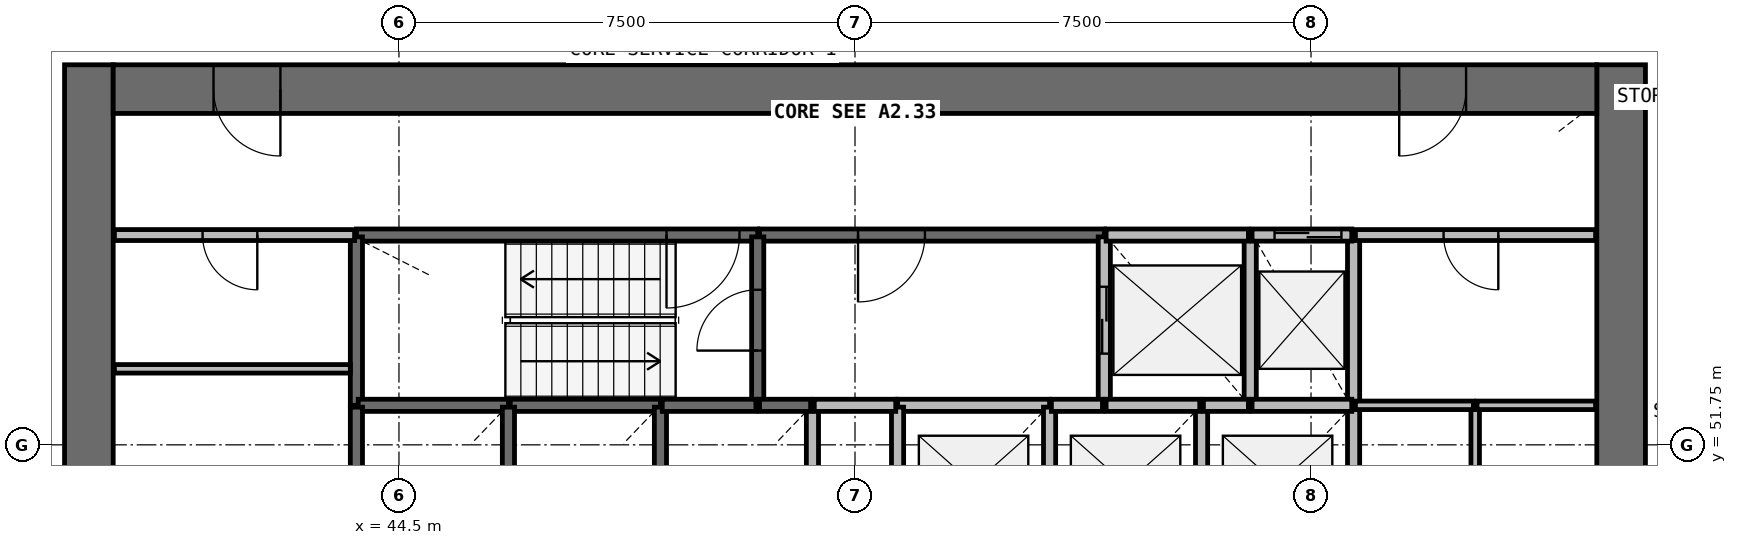
"""IFC4 building model, lengths in metres.
Left out: names, types, materials, properties, quantities, classifications, styles, units other than length and angle.
Written with IfcOpenShell. Run it as: python <this file> out.ifc"""

import sys

from ifc_helpers import new_model, si_unit, direction, frame, frame_2d, origin, place, context, subcontext, project, spatial, rectangle, extrude, source, transform, mapped, element, fill, save


model = new_model("IFC4")
c1 = context("Model", 3, precision=1e-05, world=origin(), true_north=direction((0.0, 1.0)))
c2 = subcontext(c1, "Body", "Model", "MODEL_VIEW")
j1 = project(units=[si_unit("LENGTHUNIT", "METRE"), si_unit("PLANEANGLEUNIT", "RADIAN")], contexts=[c1])
p1 = place(None, origin())
s1 = spatial("IfcSite", under=j1, at=p1, CompositionType="ELEMENT")
p2 = place(p1, origin())
s2 = spatial("IfcBuilding", under=s1, at=p2, CompositionType="ELEMENT")
p3 = place(p2, frame((0.0, 0.0, 137.0)))
s3 = spatial("IfcBuildingStorey", under=s2, at=p3, CompositionType="ELEMENT", Elevation=137.0)
p4 = place(p3, frame((64.6, 38.0, 0.0), z_axis=(0.0, 0.0, 1.0), x_axis=(0.0, 1.0, 0.0)))
e1 = element("IfcWall", 1, at=p4, inside=s3, PredefinedType="SHEAR", context=c2, shape_type="SweptSolid", body=[
    extrude(rectangle(XDim=20.0, YDim=0.8, at=frame_2d((10.0, 0.0))), origin(), (0.0, 0.0, 1.0), 3.9),
])
p5 = place(p4, frame((9.1, 0.0, 0.0)))
e2 = element("IfcOpeningElement", 2, at=p5, cuts=e1, PredefinedType="OPENING", context=c2, shape_type="SweptSolid", body=[
    extrude(rectangle(XDim=1.8, YDim=2.1, at=frame_2d((0.9, 1.05))), frame((0.0, 0.41, 0.0), z_axis=(0.0, -1.0, 0.0), x_axis=(1.0, 0.0, 0.0)), (0.0, 0.0, 1.0), 0.82),
])
p6 = place(p3, frame((39.4, 58.0, 0.0), z_axis=(0.0, 0.0, 1.0), x_axis=(0.0, -1.0, 0.0)))
e3 = element("IfcWall", 3, at=p6, inside=s3, PredefinedType="SHEAR", context=c2, shape_type="SweptSolid", body=[
    extrude(rectangle(XDim=20.0, YDim=0.8, at=frame_2d((10.0, 0.0))), origin(), (0.0, 0.0, 1.0), 3.9),
])
p7 = place(p6, frame((9.1, 0.0, 0.0)))
e4 = element("IfcOpeningElement", 4, at=p7, cuts=e3, PredefinedType="OPENING", context=c2, shape_type="SweptSolid", body=[
    extrude(rectangle(XDim=1.8, YDim=2.1, at=frame_2d((0.9, 1.05))), frame((0.0, 0.41, 0.0), z_axis=(0.0, -1.0, 0.0), x_axis=(1.0, 0.0, 0.0)), (0.0, 0.0, 1.0), 0.82),
])
p8 = place(p3, frame((64.2, 57.6, 0.0), z_axis=(0.0, 0.0, 1.0), x_axis=(-1.0, 0.0, 0.0)))
e5 = element("IfcWall", 5, at=p8, inside=s3, PredefinedType="SHEAR", context=c2, shape_type="SweptSolid", body=[
    extrude(rectangle(XDim=24.4, YDim=0.8, at=frame_2d((12.2, 0.0))), origin(), (0.0, 0.0, 1.0), 3.9),
])
p9 = place(p8, frame((21.65, 0.0, 0.0)))
e6 = element("IfcOpeningElement", 6, at=p9, cuts=e5, PredefinedType="OPENING", context=c2, shape_type="SweptSolid", body=[
    extrude(rectangle(XDim=1.1, YDim=2.1, at=frame_2d((0.55, 1.05))), frame((0.0, 0.41, 0.0), z_axis=(0.0, -1.0, 0.0), x_axis=(1.0, 0.0, 0.0)), (0.0, 0.0, 1.0), 0.82),
])
p10 = place(p8, frame((2.15, 0.0, 0.0)))
e7 = element("IfcOpeningElement", 7, at=p10, cuts=e5, PredefinedType="OPENING", context=c2, shape_type="SweptSolid", body=[
    extrude(rectangle(XDim=1.1, YDim=2.1, at=frame_2d((0.55, 1.05))), frame((0.0, 0.41, 0.0), z_axis=(0.0, -1.0, 0.0), x_axis=(1.0, 0.0, 0.0)), (0.0, 0.0, 1.0), 0.82),
])
p11 = place(p3, frame((50.4, 55.2, 0.0), z_axis=(0.0, 0.0, 1.0), x_axis=(-1.0, 0.0, 0.0)))
e8 = element("IfcWall", 8, at=p11, inside=s3, PredefinedType="SOLIDWALL", context=c2, shape_type="SweptSolid", body=[
    extrude(rectangle(XDim=6.6, YDim=0.2, at=frame_2d((3.3, 0.0))), origin(), (0.0, 0.0, 1.0), 3.58),
])
p12 = place(p11, frame((0.3, 0.0, 0.0)))
e9 = element("IfcOpeningElement", 9, at=p12, cuts=e8, PredefinedType="OPENING", context=c2, shape_type="SweptSolid", body=[
    extrude(rectangle(XDim=1.2, YDim=2.1, at=frame_2d((0.6, 1.05))), frame((0.0, 0.11, 0.0), z_axis=(0.0, -1.0, 0.0), x_axis=(1.0, 0.0, 0.0)), (0.0, 0.0, 1.0), 0.22),
])
p13 = place(p3, frame((56.1, 55.2, 0.0), z_axis=(0.0, 0.0, 1.0), x_axis=(-1.0, 0.0, 0.0)))
e10 = element("IfcWall", 10, at=p13, inside=s3, PredefinedType="SOLIDWALL", context=c2, shape_type="SweptSolid", body=[
    extrude(rectangle(XDim=5.67, YDim=0.2, at=frame_2d((2.835, 0.0))), origin(), (0.0, 0.0, 1.0), 3.58),
])
p14 = place(p13, frame((2.95, 0.0, 0.0)))
e11 = element("IfcOpeningElement", 11, at=p14, cuts=e10, PredefinedType="OPENING", context=c2, shape_type="SweptSolid", body=[
    extrude(rectangle(XDim=1.1, YDim=2.1, at=frame_2d((0.55, 1.05))), frame((0.0, 0.11, 0.0), z_axis=(0.0, -1.0, 0.0), x_axis=(1.0, 0.0, 0.0)), (0.0, 0.0, 1.0), 0.22),
])
p15 = place(p3, frame((43.8, 55.17, 0.0), z_axis=(0.0, 0.0, 1.0), x_axis=(0.0, -1.0, 0.0)))
e12 = element("IfcWall", 12, at=p15, inside=s3, PredefinedType="SOLIDWALL", context=c2, shape_type="SweptSolid", body=[
    extrude(rectangle(XDim=2.77, YDim=0.2, at=frame_2d((1.385, 0.0))), origin(), (0.0, 0.0, 1.0), 3.58),
])
p16 = place(p3, frame((50.4, 52.4, 0.0), z_axis=(0.0, 0.0, 1.0), x_axis=(0.0, 1.0, 0.0)))
e13 = element("IfcWall", 13, at=p16, inside=s3, PredefinedType="SOLIDWALL", context=c2, shape_type="SweptSolid", body=[
    extrude(rectangle(XDim=2.77, YDim=0.2, at=frame_2d((1.385, 0.0))), origin(), (0.0, 0.0, 1.0), 3.58),
])
p17 = place(p16, frame((0.9, 0.0, 0.0)))
e14 = element("IfcOpeningElement", 14, at=p17, cuts=e13, PredefinedType="OPENING", context=c2, shape_type="SweptSolid", body=[
    extrude(rectangle(XDim=1.0, YDim=2.1, at=frame_2d((0.5, 1.05))), frame((0.0, 0.11, 0.0), z_axis=(0.0, -1.0, 0.0), x_axis=(1.0, 0.0, 0.0)), (0.0, 0.0, 1.0), 0.22),
])
p18 = place(p3, frame((56.1, 55.17, 0.0), z_axis=(0.0, 0.0, 1.0), x_axis=(0.0, -1.0, 0.0)))
e15 = element("IfcWall", 15, at=p18, inside=s3, PredefinedType="SOLIDWALL", context=c2, shape_type="SweptSolid", body=[
    extrude(rectangle(XDim=2.77, YDim=0.2, at=frame_2d((1.385, 0.0))), origin(), (0.0, 0.0, 1.0), 3.58),
])
p19 = place(p18, frame((0.82, 0.0, 0.0)))
e16 = element("IfcOpeningElement", 16, at=p19, cuts=e15, PredefinedType="OPENING", context=c2, shape_type="SweptSolid", body=[
    extrude(rectangle(XDim=1.1, YDim=2.1, at=frame_2d((0.55, 1.05))), frame((0.0, 0.11, 0.0), z_axis=(0.0, -1.0, 0.0), x_axis=(1.0, 0.0, 0.0)), (0.0, 0.0, 1.0), 0.22),
])
for number, where, z_axis, x_axis in (
    (17, (58.5, 52.4, 0.0), (0.0, 0.0, 1.0), (0.0, 1.0, 0.0)),
    (18, (60.2, 52.4, 0.0), (0.0, 0.0, 1.0), (0.0, 1.0, 0.0)),
):
    element("IfcWall", number, at=place(p3, frame(where, z_axis=z_axis, x_axis=x_axis)), inside=s3, PredefinedType="SOLIDWALL", context=c2, shape_type="SweptSolid", body=[
        extrude(rectangle(XDim=2.8, YDim=0.2, at=frame_2d((1.4, 0.0))), origin(), (0.0, 0.0, 1.0), 3.58),
    ])
for number, where, z_axis, x_axis in (
    (19, (46.3, 52.4, 0.0), (0.0, 0.0, 1.0), (-1.0, 0.0, 0.0)),
    (20, (48.8, 52.4, 0.0), (0.0, 0.0, 1.0), (-1.0, 0.0, 0.0)),
):
    element("IfcWall", number, at=place(p3, frame(where, z_axis=z_axis, x_axis=x_axis)), inside=s3, PredefinedType="SOLIDWALL", context=c2, shape_type="SweptSolid", body=[
        extrude(rectangle(XDim=2.47, YDim=0.2, at=frame_2d((1.235, 0.0))), origin(), (0.0, 0.0, 1.0), 3.58),
    ])
p20 = place(p3, frame((55.2, 52.4, 0.0), z_axis=(0.0, 0.0, 1.0), x_axis=(-1.0, 0.0, 0.0)))
e21 = element("IfcWall", 21, at=p20, inside=s3, PredefinedType="SOLIDWALL", context=c2, shape_type="SweptSolid", body=[
    extrude(rectangle(XDim=2.5, YDim=0.2, at=frame_2d((1.25, 0.0))), origin(), (0.0, 0.0, 1.0), 3.58),
])
p21 = place(p3, frame((58.47, 55.2, 0.0), z_axis=(0.0, 0.0, 1.0), x_axis=(-1.0, 0.0, 0.0)))
e22 = element("IfcWall", 22, at=p21, inside=s3, PredefinedType="SOLIDWALL", context=c2, shape_type="SweptSolid", body=[
    extrude(rectangle(XDim=2.34, YDim=0.2, at=frame_2d((1.17, 0.0))), origin(), (0.0, 0.0, 1.0), 3.58),
])
for number, where, z_axis, x_axis in (
    (23, (43.8, 52.37, 0.0), (0.0, 0.0, 1.0), (0.0, -1.0, 0.0)),
    (24, (46.3, 50.01, 0.0), (0.0, 0.0, 1.0), (0.0, 1.0, 0.0)),
    (25, (48.8, 50.01, 0.0), (0.0, 0.0, 1.0), (0.0, 1.0, 0.0)),
):
    element("IfcWall", number, at=place(p3, frame(where, z_axis=z_axis, x_axis=x_axis)), inside=s3, PredefinedType="SOLIDWALL", context=c2, shape_type="SweptSolid", body=[
        extrude(rectangle(XDim=2.36, YDim=0.2, at=frame_2d((1.18, 0.0))), origin(), (0.0, 0.0, 1.0), 3.58),
    ])
p22 = place(p3, frame((51.3, 50.01, 0.0), z_axis=(0.0, 0.0, 1.0), x_axis=(0.0, 1.0, 0.0)))
e26 = element("IfcWall", 26, at=p22, inside=s3, PredefinedType="SOLIDWALL", context=c2, shape_type="SweptSolid", body=[
    extrude(rectangle(XDim=2.39, YDim=0.2, at=frame_2d((1.195, 0.0))), origin(), (0.0, 0.0, 1.0), 3.58),
])
for number, where, z_axis, x_axis in (
    (27, (52.7, 52.37, 0.0), (0.0, 0.0, 1.0), (0.0, -1.0, 0.0)),
    (28, (55.2, 50.01, 0.0), (0.0, 0.0, 1.0), (0.0, 1.0, 0.0)),
):
    element("IfcWall", number, at=place(p3, frame(where, z_axis=z_axis, x_axis=x_axis)), inside=s3, PredefinedType="SOLIDWALL", context=c2, shape_type="SweptSolid", body=[
        extrude(rectangle(XDim=2.36, YDim=0.2, at=frame_2d((1.18, 0.0))), origin(), (0.0, 0.0, 1.0), 3.58),
    ])
p23 = place(p3, frame((57.7, 50.01, 0.0), z_axis=(0.0, 0.0, 1.0), x_axis=(0.0, 1.0, 0.0)))
e29 = element("IfcWall", 29, at=p23, inside=s3, PredefinedType="SOLIDWALL", context=c2, shape_type="SweptSolid", body=[
    extrude(rectangle(XDim=2.39, YDim=0.2, at=frame_2d((1.195, 0.0))), origin(), (0.0, 0.0, 1.0), 3.58),
])
p24 = place(p3, frame((60.2, 50.01, 0.0), z_axis=(0.0, 0.0, 1.0), x_axis=(0.0, 1.0, 0.0)))
e30 = element("IfcWall", 30, at=p24, inside=s3, PredefinedType="SOLIDWALL", context=c2, shape_type="SweptSolid", body=[
    extrude(rectangle(XDim=2.36, YDim=0.2, at=frame_2d((1.18, 0.0))), origin(), (0.0, 0.0, 1.0), 3.58),
])
p25 = place(p3, frame((60.17, 52.4, 0.0), z_axis=(0.0, 0.0, 1.0), x_axis=(-1.0, 0.0, 0.0)))
e31 = element("IfcWall", 31, at=p25, inside=s3, PredefinedType="SOLIDWALL", context=c2, shape_type="SweptSolid", body=[
    extrude(rectangle(XDim=1.64, YDim=0.2, at=frame_2d((0.82, 0.0))), origin(), (0.0, 0.0, 1.0), 3.58),
])
p26 = place(p3, frame((60.17, 55.2, 0.0), z_axis=(0.0, 0.0, 1.0), x_axis=(-1.0, 0.0, 0.0)))
e32 = element("IfcWall", 32, at=p26, inside=s3, PredefinedType="SOLIDWALL", context=c2, shape_type="SweptSolid", body=[
    extrude(rectangle(XDim=1.64, YDim=0.2, at=frame_2d((0.82, 0.0))), origin(), (0.0, 0.0, 1.0), 3.58),
])
p27 = place(p26, frame((0.17, 0.0, 0.0)))
e33 = element("IfcOpeningElement", 33, at=p27, cuts=e32, PredefinedType="OPENING", context=c2, shape_type="SweptSolid", body=[
    extrude(rectangle(XDim=1.1, YDim=2.1, at=frame_2d((0.55, 1.05))), frame((0.0, 0.11, 0.0), z_axis=(0.0, -1.0, 0.0), x_axis=(1.0, 0.0, 0.0)), (0.0, 0.0, 1.0), 0.22),
])
for number, where, z_axis, x_axis in (
    (34, (50.37, 52.4, 0.0), (0.0, 0.0, 1.0), (-1.0, 0.0, 0.0)),
    (35, (57.67, 52.4, 0.0), (0.0, 0.0, 1.0), (-1.0, 0.0, 0.0)),
):
    element("IfcWall", number, at=place(p3, frame(where, z_axis=z_axis, x_axis=x_axis)), inside=s3, PredefinedType="SOLIDWALL", context=c2, shape_type="SweptSolid", body=[
        extrude(rectangle(XDim=1.54, YDim=0.2, at=frame_2d((0.77, 0.0))), origin(), (0.0, 0.0, 1.0), 3.58),
    ])
p28 = place(p3, frame((51.33, 52.4, 0.0), z_axis=(0.0, 0.0, 1.0), x_axis=(1.0, 0.0, 0.0)))
e36 = element("IfcWall", 36, at=p28, inside=s3, PredefinedType="SOLIDWALL", context=c2, shape_type="SweptSolid", body=[
    extrude(rectangle(XDim=1.34, YDim=0.2, at=frame_2d((0.67, 0.0))), origin(), (0.0, 0.0, 1.0), 3.58),
])
for number, where, z_axis, x_axis in (
    (37, (51.27, 52.4, 0.0), (0.0, 0.0, 1.0), (-1.0, 0.0, 0.0)),
    (38, (56.07, 52.4, 0.0), (0.0, 0.0, 1.0), (-1.0, 0.0, 0.0)),
):
    element("IfcWall", number, at=place(p3, frame(where, z_axis=z_axis, x_axis=x_axis)), inside=s3, PredefinedType="SOLIDWALL", context=c2, shape_type="SweptSolid", body=[
        extrude(rectangle(XDim=0.84, YDim=0.2, at=frame_2d((0.42, 0.0))), origin(), (0.0, 0.0, 1.0), 3.58),
    ])
p29 = place(p3, frame((58.47, 52.4, 0.0), z_axis=(0.0, 0.0, 1.0), x_axis=(-1.0, 0.0, 0.0)))
e39 = element("IfcWall", 39, at=p29, inside=s3, PredefinedType="SOLIDWALL", context=c2, shape_type="SweptSolid", body=[
    extrude(rectangle(XDim=0.74, YDim=0.2, at=frame_2d((0.37, 0.0))), origin(), (0.0, 0.0, 1.0), 3.58),
])
p30 = place(p3, frame((64.18, 55.2, 0.0), z_axis=(0.0, 0.0, 1.0), x_axis=(-1.0, 0.0, 0.0)))
e40 = element("IfcWall", 40, at=p30, inside=s3, PredefinedType="PARTITIONING", context=c2, shape_type="SweptSolid", body=[
    extrude(rectangle(XDim=3.95, YDim=0.18, at=frame_2d((1.975, 0.0))), origin(), (0.0, 0.0, 1.0), 2.7),
])
p31 = place(p30, frame((1.6, 0.0, 0.0)))
e41 = element("IfcOpeningElement", 41, at=p31, cuts=e40, PredefinedType="OPENING", context=c2, shape_type="SweptSolid", body=[
    extrude(rectangle(XDim=0.9, YDim=2.1, at=frame_2d((0.45, 1.05))), frame((0.0, 0.1, 0.0), z_axis=(0.0, -1.0, 0.0), x_axis=(1.0, 0.0, 0.0)), (0.0, 0.0, 1.0), 0.2),
])
p32 = place(p3, frame((43.77, 55.2, 0.0), z_axis=(0.0, 0.0, 1.0), x_axis=(-1.0, 0.0, 0.0)))
e42 = element("IfcWall", 42, at=p32, inside=s3, PredefinedType="PARTITIONING", context=c2, shape_type="SweptSolid", body=[
    extrude(rectangle(XDim=3.95, YDim=0.18, at=frame_2d((1.975, 0.0))), origin(), (0.0, 0.0, 1.0), 2.7),
])
p33 = place(p32, frame((1.6, 0.0, 0.0)))
e43 = element("IfcOpeningElement", 43, at=p33, cuts=e42, PredefinedType="OPENING", context=c2, shape_type="SweptSolid", body=[
    extrude(rectangle(XDim=0.9, YDim=2.1, at=frame_2d((0.45, 1.05))), frame((0.0, 0.1, 0.0), z_axis=(0.0, -1.0, 0.0), x_axis=(1.0, 0.0, 0.0)), (0.0, 0.0, 1.0), 0.2),
])
p34 = place(p3, frame((39.82, 53.0, 0.0), z_axis=(0.0, 0.0, 1.0), x_axis=(1.0, 0.0, 0.0)))
e44 = element("IfcWall", 44, at=p34, inside=s3, PredefinedType="PARTITIONING", context=c2, shape_type="SweptSolid", body=[
    extrude(rectangle(XDim=3.88, YDim=0.14, at=frame_2d((1.94, 0.0))), origin(), (0.0, 0.0, 1.0), 2.88),
])
p35 = place(p3, frame((62.2, 50.01, 0.0), z_axis=(0.0, 0.0, 1.0), x_axis=(0.0, 1.0, 0.0)))
e45 = element("IfcWall", 45, at=p35, inside=s3, PredefinedType="PARTITIONING", context=c2, shape_type="SweptSolid", body=[
    extrude(rectangle(XDim=2.39, YDim=0.14, at=frame_2d((1.195, 0.0))), origin(), (0.0, 0.0, 1.0), 2.88),
])
p36 = place(p3, frame((62.17, 52.4, 0.0), z_axis=(0.0, 0.0, 1.0), x_axis=(-1.0, 0.0, 0.0)))
e46 = element("IfcWall", 46, at=p36, inside=s3, PredefinedType="PARTITIONING", context=c2, shape_type="SweptSolid", body=[
    extrude(rectangle(XDim=1.94, YDim=0.14, at=frame_2d((0.97, 0.0))), origin(), (0.0, 0.0, 1.0), 2.88),
])
p37 = place(p3, frame((64.18, 52.4, 0.0), z_axis=(0.0, 0.0, 1.0), x_axis=(-1.0, 0.0, 0.0)))
e47 = element("IfcWall", 47, at=p37, inside=s3, PredefinedType="PARTITIONING", context=c2, shape_type="SweptSolid", body=[
    extrude(rectangle(XDim=1.95, YDim=0.14, at=frame_2d((0.975, 0.0))), origin(), (0.0, 0.0, 1.0), 2.88),
])
m1 = source(origin(), c2, "Body", "SweptSolid", [
    extrude(rectangle(XDim=1.1, YDim=2.1, at=frame_2d((0.55, 1.05))), frame((0.0, 0.025, 0.0), z_axis=(0.0, -1.0, 0.0), x_axis=(1.0, 0.0, 0.0)), (0.0, 0.0, 1.0), 0.05),
])
p38 = place(p19, origin())
e48 = element("IfcDoor", 48, at=p38, inside=s3, OperationType="DOUBLE_DOOR_SLIDING", PredefinedType="USERDEFINED", context=c2, shape_type="MappedRepresentation", body=[
    mapped(m1, transform((0.0, 0.0, 0.0), scale=1.0)),
])
fill(e16, e48)
p39 = place(p27, origin())
e49 = element("IfcDoor", 49, at=p39, inside=s3, OperationType="DOUBLE_DOOR_SLIDING", PredefinedType="USERDEFINED", context=c2, shape_type="MappedRepresentation", body=[
    mapped(m1, transform((0.0, 0.0, 0.0), scale=1.0)),
])
fill(e33, e49)
m2 = source(origin(), c2, "Body", "SweptSolid", [
    extrude(rectangle(XDim=1.2, YDim=2.1, at=frame_2d((0.6, 1.05))), frame((0.0, 0.025, 0.0), z_axis=(0.0, -1.0, 0.0), x_axis=(1.0, 0.0, 0.0)), (0.0, 0.0, 1.0), 0.05),
])
p40 = place(p12, origin())
e50 = element("IfcDoor", 50, at=p40, inside=s3, OperationType="SINGLE_SWING_RIGHT", PredefinedType="DOOR", context=c2, shape_type="MappedRepresentation", body=[
    mapped(m2, transform((0.0, 0.0, 0.0), scale=1.0)),
])
fill(e9, e50)
m3 = source(origin(), c2, "Body", "SweptSolid", [
    extrude(rectangle(XDim=1.0, YDim=2.1, at=frame_2d((0.5, 1.05))), frame((0.0, 0.025, 0.0), z_axis=(0.0, -1.0, 0.0), x_axis=(1.0, 0.0, 0.0)), (0.0, 0.0, 1.0), 0.05),
])
p41 = place(p17, origin())
e51 = element("IfcDoor", 51, at=p41, inside=s3, OperationType="SINGLE_SWING_LEFT", PredefinedType="DOOR", context=c2, shape_type="MappedRepresentation", body=[
    mapped(m3, transform((0.0, 0.0, 0.0), scale=1.0)),
])
fill(e14, e51)
m4 = source(origin(), c2, "Body", "SweptSolid", [
    extrude(rectangle(XDim=1.1, YDim=2.1, at=frame_2d((0.55, 1.05))), frame((0.0, 0.025, 0.0), z_axis=(0.0, -1.0, 0.0), x_axis=(1.0, 0.0, 0.0)), (0.0, 0.0, 1.0), 0.05),
])
p42 = place(p14, origin())
e52 = element("IfcDoor", 52, at=p42, inside=s3, OperationType="SINGLE_SWING_RIGHT", PredefinedType="DOOR", context=c2, shape_type="MappedRepresentation", body=[
    mapped(m4, transform((0.0, 0.0, 0.0), scale=1.0)),
])
fill(e11, e52)
m5 = source(origin(), c2, "Body", "SweptSolid", [
    extrude(rectangle(XDim=1.1, YDim=2.1, at=frame_2d((0.55, 1.05))), frame((0.0, 0.025, 0.0), z_axis=(0.0, -1.0, 0.0), x_axis=(1.0, 0.0, 0.0)), (0.0, 0.0, 1.0), 0.05),
])
p43 = place(p9, origin())
e53 = element("IfcDoor", 53, at=p43, inside=s3, OperationType="SINGLE_SWING_LEFT", PredefinedType="DOOR", context=c2, shape_type="MappedRepresentation", body=[
    mapped(m5, transform((0.0, 0.0, 0.0), scale=1.0)),
])
fill(e6, e53)
p44 = place(p10, origin())
e54 = element("IfcDoor", 54, at=p44, inside=s3, OperationType="SINGLE_SWING_RIGHT", PredefinedType="DOOR", context=c2, shape_type="MappedRepresentation", body=[
    mapped(m5, transform((0.0, 0.0, 0.0), scale=1.0)),
])
fill(e7, e54)
m6 = source(origin(), c2, "Body", "SweptSolid", [
    extrude(rectangle(XDim=0.9, YDim=2.1, at=frame_2d((0.45, 1.05))), frame((0.0, 0.025, 0.0), z_axis=(0.0, -1.0, 0.0), x_axis=(1.0, 0.0, 0.0)), (0.0, 0.0, 1.0), 0.05),
])
p45 = place(p33, origin())
e55 = element("IfcDoor", 55, at=p45, inside=s3, OperationType="SINGLE_SWING_LEFT", PredefinedType="DOOR", context=c2, shape_type="MappedRepresentation", body=[
    mapped(m6, transform((0.0, 0.0, 0.0), scale=1.0)),
])
fill(e43, e55)
p46 = place(p31, origin())
e56 = element("IfcDoor", 56, at=p46, inside=s3, OperationType="SINGLE_SWING_LEFT", PredefinedType="DOOR", context=c2, shape_type="MappedRepresentation", body=[
    mapped(m6, transform((0.0, 0.0, 0.0), scale=1.0)),
])
fill(e41, e56)
save(model, sys.argv[1])
